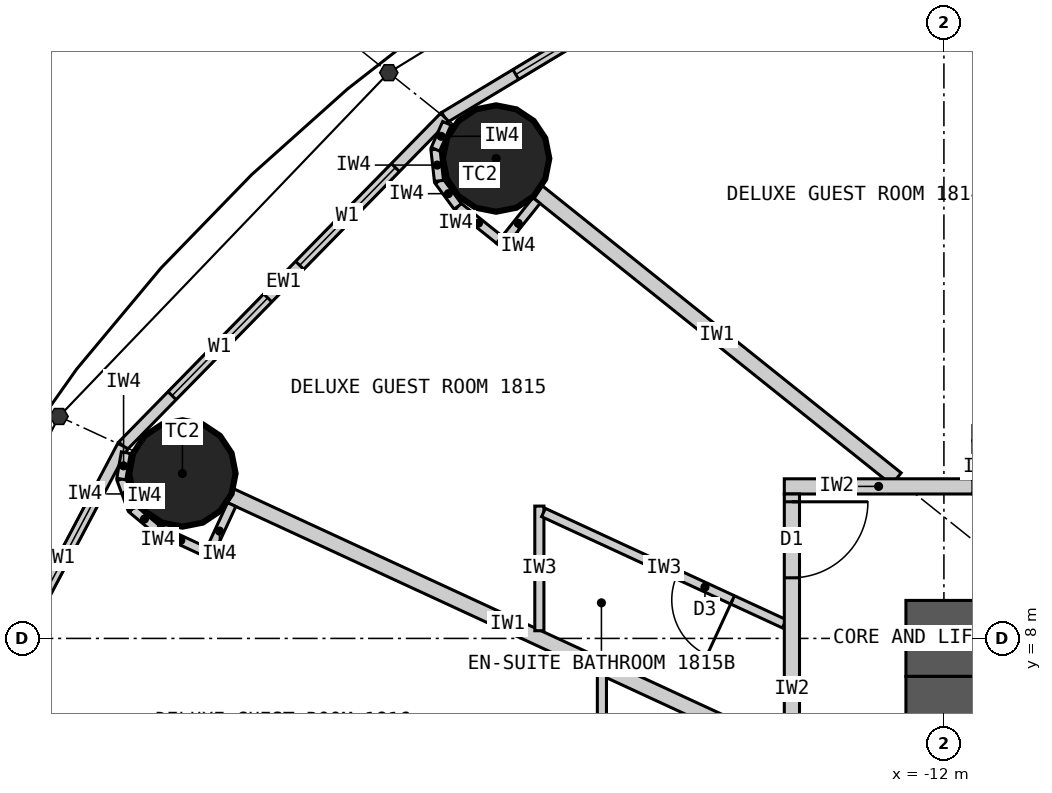
"""IFC4 building model, lengths in metres.
Left out: names, types, materials, properties, quantities, classifications, styles, units other than length and angle.
Written with IfcOpenShell. Run it as: python <this file> out.ifc"""

import sys

from ifc_helpers import new_model, si_unit, direction, frame, frame_2d, origin, origin_2d, place, context, subcontext, project, spatial, rectangle, circle, extrude, element, fill, save


model = new_model("IFC4")
c1 = context("Model", 3, precision=1e-05, world=origin(), true_north=direction((0.0, 1.0)))
c2 = subcontext(c1, "Body", "Model", "MODEL_VIEW")
j1 = project(units=[si_unit("LENGTHUNIT", "METRE"), si_unit("PLANEANGLEUNIT", "RADIAN")], contexts=[c1])
p1 = place(None, origin())
s1 = spatial("IfcSite", under=j1, at=p1, CompositionType="ELEMENT")
p2 = place(p1, origin())
s2 = spatial("IfcBuilding", under=s1, at=p2, CompositionType="ELEMENT")
p3 = place(p2, frame((0.0, 0.0, 73.8)))
s3 = spatial("IfcBuildingStorey", under=s2, at=p3, CompositionType="ELEMENT", Elevation=73.8)
for number, where, z_axis, x_axis in (
    (1, (-17.892, 14.313, 0.0), (0.0, 0.0, 1.0), (1.0, 0.0, 0.0)),
    (2, (-22.019, 10.17, 0.0), (0.0, 0.0, 1.0), (1.0, 0.0, 0.0)),
):
    element("IfcColumn", number, at=place(p3, frame(where, z_axis=z_axis, x_axis=x_axis)), inside=s3, PredefinedType="COLUMN", context=c2, shape_type="SweptSolid", body=[
        extrude(circle(Radius=0.7, at=origin_2d()), origin(), (0.0, 0.0, 1.0), 3.3),
    ])
p4 = place(p3, frame((-12.5, 8.0, 0.0), z_axis=(0.0, 0.0, 1.0), x_axis=(1.0, 0.0, 0.0)))
e3 = element("IfcWall", 3, at=p4, inside=s3, PredefinedType="SHEAR", context=c2, shape_type="SweptSolid", body=[
    extrude(rectangle(XDim=25.0, YDim=1.0, at=frame_2d((12.5, 0.0))), origin(), (0.0, 0.0, 1.0), 3.3),
])
p5 = place(p4, frame((11.2, 0.0, 0.0)))
e4 = element("IfcOpeningElement", 4, at=p5, cuts=e3, PredefinedType="OPENING", context=c2, shape_type="SweptSolid", body=[
    extrude(rectangle(XDim=1.2, YDim=2.2, at=frame_2d((0.6, 1.1))), frame((0.0, 0.51, 0.0), z_axis=(0.0, -1.0, 0.0), x_axis=(1.0, 0.0, 0.0)), (0.0, 0.0, 1.0), 1.02),
])
p6 = place(p4, frame((18.8, 0.0, 0.0)))
e5 = element("IfcOpeningElement", 5, at=p6, cuts=e3, PredefinedType="OPENING", context=c2, shape_type="SweptSolid", body=[
    extrude(rectangle(XDim=0.9, YDim=2.2, at=frame_2d((0.45, 1.1))), frame((0.0, 0.51, 0.0), z_axis=(0.0, -1.0, 0.0), x_axis=(1.0, 0.0, 0.0)), (0.0, 0.0, 1.0), 1.02),
])
p7 = place(p3, frame((-12.0, 7.5, 0.0), z_axis=(0.0, 0.0, 1.0), x_axis=(0.0, -1.0, 0.0)))
e6 = element("IfcWall", 6, at=p7, inside=s3, PredefinedType="SHEAR", context=c2, shape_type="SweptSolid", body=[
    extrude(rectangle(XDim=15.0, YDim=1.0, at=frame_2d((7.5, 0.0))), origin(), (0.0, 0.0, 1.0), 3.3),
])
p8 = place(p7, frame((6.6, 0.0, 0.0)))
e7 = element("IfcOpeningElement", 7, at=p8, cuts=e6, PredefinedType="OPENING", context=c2, shape_type="SweptSolid", body=[
    extrude(rectangle(XDim=1.8, YDim=2.2, at=frame_2d((0.9, 1.1))), frame((0.0, 0.51, 0.0), z_axis=(0.0, -1.0, 0.0), x_axis=(1.0, 0.0, 0.0)), (0.0, 0.0, 1.0), 1.02),
])
p9 = place(p3, frame((-13.096, 18.147, 0.0), z_axis=(0.0, 0.0, 1.0), x_axis=(-0.856983180864, -0.515344377787, 0.0)))
e8 = element("IfcWall", 8, at=p9, inside=s3, PredefinedType="ELEMENTEDWALL", context=c2, shape_type="SweptSolid", body=[
    extrude(rectangle(XDim=6.386, YDim=0.15, at=frame_2d((3.193, 0.0))), origin(), (0.0, 0.0, 1.0), 3.12),
])
p10 = place(p9, frame((1.093, 0.0, 0.9)))
e9 = element("IfcOpeningElement", 9, at=p10, cuts=e8, PredefinedType="OPENING", context=c2, shape_type="SweptSolid", body=[
    extrude(rectangle(XDim=1.8, YDim=1.9, at=frame_2d((0.9, 0.95))), frame((0.0, 0.085, 0.0), z_axis=(0.0, -1.0, 0.0), x_axis=(1.0, 0.0, 0.0)), (0.0, 0.0, 1.0), 0.17),
])
p11 = place(p9, frame((3.493, 0.0, 0.9)))
e10 = element("IfcOpeningElement", 10, at=p11, cuts=e8, PredefinedType="OPENING", context=c2, shape_type="SweptSolid", body=[
    extrude(rectangle(XDim=1.8, YDim=1.9, at=frame_2d((0.9, 0.95))), frame((0.0, 0.085, 0.0), z_axis=(0.0, -1.0, 0.0), x_axis=(1.0, 0.0, 0.0)), (0.0, 0.0, 1.0), 0.17),
])
p12 = place(p3, frame((-18.57, 14.856, 0.0), z_axis=(0.0, 0.0, 1.0), x_axis=(-0.699602905915, -0.714531856557, 0.0)))
e11 = element("IfcWall", 11, at=p12, inside=s3, PredefinedType="ELEMENTEDWALL", context=c2, shape_type="SweptSolid", body=[
    extrude(rectangle(XDim=6.051, YDim=0.15, at=frame_2d((3.025, 0.0))), origin(), (0.0, 0.0, 1.0), 3.12),
])
p13 = place(p12, frame((0.926, 0.0, 0.9)))
e12 = element("IfcOpeningElement", 12, at=p13, cuts=e11, PredefinedType="OPENING", context=c2, shape_type="SweptSolid", body=[
    extrude(rectangle(XDim=1.8, YDim=1.9, at=frame_2d((0.9, 0.95))), frame((0.0, 0.085, 0.0), z_axis=(0.0, -1.0, 0.0), x_axis=(1.0, 0.0, 0.0)), (0.0, 0.0, 1.0), 0.17),
])
p14 = place(p12, frame((3.325, 0.0, 0.9)))
e13 = element("IfcOpeningElement", 13, at=p14, cuts=e11, PredefinedType="OPENING", context=c2, shape_type="SweptSolid", body=[
    extrude(rectangle(XDim=1.8, YDim=1.9, at=frame_2d((0.9, 0.95))), frame((0.0, 0.085, 0.0), z_axis=(0.0, -1.0, 0.0), x_axis=(1.0, 0.0, 0.0)), (0.0, 0.0, 1.0), 0.17),
])
p15 = place(p3, frame((-22.803, 10.532, 0.0), z_axis=(0.0, 0.0, 1.0), x_axis=(-0.467296867008, -0.884100468321, 0.0)))
e14 = element("IfcWall", 14, at=p15, inside=s3, PredefinedType="ELEMENTEDWALL", context=c2, shape_type="SweptSolid", body=[
    extrude(rectangle(XDim=5.734, YDim=0.15, at=frame_2d((2.867, 0.0))), origin(), (0.0, 0.0, 1.0), 3.12),
])
p16 = place(p15, frame((0.767, 0.0, 0.9)))
e15 = element("IfcOpeningElement", 15, at=p16, cuts=e14, PredefinedType="OPENING", context=c2, shape_type="SweptSolid", body=[
    extrude(rectangle(XDim=1.8, YDim=1.9, at=frame_2d((0.9, 0.95))), frame((0.0, 0.085, 0.0), z_axis=(0.0, -1.0, 0.0), x_axis=(1.0, 0.0, 0.0)), (0.0, 0.0, 1.0), 0.17),
])
p17 = place(p15, frame((3.167, 0.0, 0.9)))
e16 = element("IfcOpeningElement", 16, at=p17, cuts=e14, PredefinedType="OPENING", context=c2, shape_type="SweptSolid", body=[
    extrude(rectangle(XDim=1.8, YDim=1.9, at=frame_2d((0.9, 0.95))), frame((0.0, 0.085, 0.0), z_axis=(0.0, -1.0, 0.0), x_axis=(1.0, 0.0, 0.0)), (0.0, 0.0, 1.0), 0.17),
])
p18 = place(p3, frame((-7.289, 10.1, 0.0), z_axis=(0.0, 0.0, 1.0), x_axis=(-0.585198353053, 0.810890182197, 0.0)))
e17 = element("IfcWall", 17, at=p18, inside=s3, PredefinedType="PARTITIONING", context=c2, shape_type="SweptSolid", body=[
    extrude(rectangle(XDim=8.36, YDim=0.2, at=frame_2d((4.18, 0.0))), origin(), (0.0, 0.0, 1.0), 2.32),
])
p19 = place(p3, frame((-12.625, 10.1, 0.0), z_axis=(0.0, 0.0, 1.0), x_axis=(-0.780892451574, 0.624665493744, 0.0)))
e18 = element("IfcWall", 18, at=p19, inside=s3, PredefinedType="PARTITIONING", context=c2, shape_type="SweptSolid", body=[
    extrude(rectangle(XDim=6.045, YDim=0.2, at=frame_2d((3.022, 0.0))), origin(), (0.0, 0.0, 1.0), 2.32),
])
p20 = place(p3, frame((-14.1, 6.512, 0.0), z_axis=(0.0, 0.0, 1.0), x_axis=(-0.907832871056, 0.419332181247, 0.0)))
e19 = element("IfcWall", 19, at=p20, inside=s3, PredefinedType="PARTITIONING", context=c2, shape_type="SweptSolid", body=[
    extrude(rectangle(XDim=8.023, YDim=0.2, at=frame_2d((4.011, 0.0))), origin(), (0.0, 0.0, 1.0), 2.32),
])
p21 = place(p3, frame((-17.323, 8.101, 0.0), z_axis=(0.0, 0.0, 1.0), x_axis=(0.0, 1.0, 0.0)))
e20 = element("IfcWall", 20, at=p21, inside=s3, PredefinedType="PARTITIONING", context=c2, shape_type="SweptSolid", body=[
    extrude(rectangle(XDim=1.64, YDim=0.12, at=frame_2d((0.82, 0.0))), origin(), (0.0, 0.0, 1.0), 3.12),
])
p22 = place(p3, frame((-14.1, 8.193, 0.0), z_axis=(0.0, 0.0, 1.0), x_axis=(-0.907836493557, 0.419324338628, 0.0)))
e21 = element("IfcWall", 21, at=p22, inside=s3, PredefinedType="PARTITIONING", context=c2, shape_type="SweptSolid", body=[
    extrude(rectangle(XDim=3.49, YDim=0.12, at=frame_2d((1.745, 0.0))), origin(), (0.0, 0.0, 1.0), 3.12),
])
p23 = place(p22, frame((0.75, 0.0, 0.0)))
e22 = element("IfcOpeningElement", 22, at=p23, cuts=e21, PredefinedType="OPENING", context=c2, shape_type="SweptSolid", body=[
    extrude(rectangle(XDim=0.8, YDim=2.1, at=frame_2d((0.4, 1.05))), frame((0.0, 0.07, 0.0), z_axis=(0.0, -1.0, 0.0), x_axis=(1.0, 0.0, 0.0)), (0.0, 0.0, 1.0), 0.14),
])
p24 = place(p3, frame((-16.5, 7.521, 0.0), z_axis=(0.0, 0.0, 1.0), x_axis=(0.0, -1.0, 0.0)))
e23 = element("IfcWall", 23, at=p24, inside=s3, PredefinedType="PARTITIONING", context=c2, shape_type="SweptSolid", body=[
    extrude(rectangle(XDim=2.749, YDim=0.12, at=frame_2d((1.374, 0.0))), origin(), (0.0, 0.0, 1.0), 3.12),
])
p25 = place(p3, frame((-14.1, 10.0, 0.0), z_axis=(0.0, 0.0, 1.0), x_axis=(1.0, 0.0, 0.0)))
e24 = element("IfcWall", 24, at=p25, inside=s3, PredefinedType="PARTITIONING", context=c2, shape_type="SweptSolid", body=[
    extrude(rectangle(XDim=2.481, YDim=0.2, at=frame_2d((1.24, 0.0))), origin(), (0.0, 0.0, 1.0), 3.12),
])
p26 = place(p3, frame((-14.0, 9.9, 0.0), z_axis=(0.0, 0.0, 1.0), x_axis=(0.0, -1.0, 0.0)))
e25 = element("IfcWall", 25, at=p26, inside=s3, PredefinedType="PARTITIONING", context=c2, shape_type="SweptSolid", body=[
    extrude(rectangle(XDim=5.127, YDim=0.2, at=frame_2d((2.564, 0.0))), origin(), (0.0, 0.0, 1.0), 3.12),
])
p27 = place(p26, frame((0.103, 0.0, 0.0)))
e26 = element("IfcOpeningElement", 26, at=p27, cuts=e25, PredefinedType="OPENING", context=c2, shape_type="SweptSolid", body=[
    extrude(rectangle(XDim=1.0, YDim=2.2, at=frame_2d((0.5, 1.1))), frame((0.0, 0.11, 0.0), z_axis=(0.0, -1.0, 0.0), x_axis=(1.0, 0.0, 0.0)), (0.0, 0.0, 1.0), 0.22),
])
p28 = place(p3, frame((-17.361, 13.76, 0.0), z_axis=(0.0, 0.0, 1.0), x_axis=(-0.624501042889, -0.781023973659, 0.0)))
e27 = element("IfcWall", 27, at=p28, inside=s3, PredefinedType="PARTITIONING", context=c2, shape_type="SweptSolid", body=[
    extrude(rectangle(XDim=0.767, YDim=0.12, at=frame_2d((0.384, 0.0))), origin(), (0.0, 0.0, 1.0), 3.12),
])
p29 = place(p3, frame((-17.85, 13.246, 0.0), z_axis=(0.0, 0.0, 1.0), x_axis=(-0.780902834923, 0.62465251333, 0.0)))
e28 = element("IfcWall", 28, at=p29, inside=s3, PredefinedType="PARTITIONING", context=c2, shape_type="SweptSolid", body=[
    extrude(rectangle(XDim=0.7, YDim=0.12, at=frame_2d((0.35, 0.0))), origin(), (0.0, 0.0, 1.0), 3.12),
])
for number, where, z_axis, x_axis in (
    (29, (-18.396, 13.683, 0.0), (0.0, 0.0, 1.0), (-0.592, 0.806, 0.0)),
    (30, (-18.644, 14.02, 0.0), (0.0, 0.0, 1.0), (-0.11, 0.994, 0.0)),
):
    element("IfcWall", number, at=place(p3, frame(where, z_axis=z_axis, x_axis=x_axis)), inside=s3, PredefinedType="PARTITIONING", context=c2, shape_type="SweptSolid", body=[
        extrude(rectangle(XDim=0.418, YDim=0.12, at=frame_2d((0.209, 0.0))), origin(), (0.0, 0.0, 1.0), 3.12),
    ])
p30 = place(p3, frame((-18.69, 14.435, 0.0), z_axis=(0.0, 0.0, 1.0), x_axis=(0.401093412634, 0.91603715773, 0.0)))
e31 = element("IfcWall", 31, at=p30, inside=s3, PredefinedType="PARTITIONING", context=c2, shape_type="SweptSolid", body=[
    extrude(rectangle(XDim=0.373, YDim=0.12, at=frame_2d((0.187, 0.0))), origin(), (0.0, 0.0, 1.0), 3.12),
])
p31 = place(p3, frame((-21.371, 9.761, 0.0), z_axis=(0.0, 0.0, 1.0), x_axis=(-0.419259891039, -0.907866258744, 0.0)))
e32 = element("IfcWall", 32, at=p31, inside=s3, PredefinedType="PARTITIONING", context=c2, shape_type="SweptSolid", body=[
    extrude(rectangle(XDim=0.768, YDim=0.12, at=frame_2d((0.384, 0.0))), origin(), (0.0, 0.0, 1.0), 3.12),
])
p32 = place(p3, frame((-21.722, 9.144, 0.0), z_axis=(0.0, 0.0, 1.0), x_axis=(-0.907877701396, 0.419235112208, 0.0)))
e33 = element("IfcWall", 33, at=p32, inside=s3, PredefinedType="PARTITIONING", context=c2, shape_type="SweptSolid", body=[
    extrude(rectangle(XDim=0.7, YDim=0.12, at=frame_2d((0.35, 0.0))), origin(), (0.0, 0.0, 1.0), 3.12),
])
p33 = place(p3, frame((-22.358, 9.437, 0.0), z_axis=(0.0, 0.0, 1.0), x_axis=(-0.768412687942, 0.639954639806, 0.0)))
e34 = element("IfcWall", 34, at=p33, inside=s3, PredefinedType="PARTITIONING", context=c2, shape_type="SweptSolid", body=[
    extrude(rectangle(XDim=0.418, YDim=0.12, at=frame_2d((0.209, 0.0))), origin(), (0.0, 0.0, 1.0), 3.12),
])
p34 = place(p3, frame((-22.679, 9.705, 0.0), z_axis=(0.0, 0.0, 1.0), x_axis=(-0.345164001646, 0.938542386879, 0.0)))
e35 = element("IfcWall", 35, at=p34, inside=s3, PredefinedType="PARTITIONING", context=c2, shape_type="SweptSolid", body=[
    extrude(rectangle(XDim=0.418, YDim=0.12, at=frame_2d((0.209, 0.0))), origin(), (0.0, 0.0, 1.0), 3.12),
])
p35 = place(p3, frame((-22.823, 10.097, 0.0), z_axis=(0.0, 0.0, 1.0), x_axis=(0.169674995186, 0.985500074079, 0.0)))
e36 = element("IfcWall", 36, at=p35, inside=s3, PredefinedType="PARTITIONING", context=c2, shape_type="SweptSolid", body=[
    extrude(rectangle(XDim=0.353, YDim=0.12, at=frame_2d((0.176, 0.0))), origin(), (0.0, 0.0, 1.0), 3.12),
])
p36 = place(p11, origin())
e37 = element("IfcWindow", 37, at=p36, inside=s3, PartitioningType="SINGLE_PANEL", PredefinedType="WINDOW", context=c2, shape_type="SweptSolid", body=[
    extrude(rectangle(XDim=1.8, YDim=1.9, at=frame_2d((0.9, 0.95))), frame((0.0, 0.03, 0.0), z_axis=(0.0, -1.0, 0.0), x_axis=(1.0, 0.0, 0.0)), (0.0, 0.0, 1.0), 0.06),
])
fill(e10, e37)
p37 = place(p13, origin())
e38 = element("IfcWindow", 38, at=p37, inside=s3, PartitioningType="SINGLE_PANEL", PredefinedType="WINDOW", context=c2, shape_type="SweptSolid", body=[
    extrude(rectangle(XDim=1.8, YDim=1.9, at=frame_2d((0.9, 0.95))), frame((0.0, 0.03, 0.0), z_axis=(0.0, -1.0, 0.0), x_axis=(1.0, 0.0, 0.0)), (0.0, 0.0, 1.0), 0.06),
])
fill(e12, e38)
p38 = place(p14, origin())
e39 = element("IfcWindow", 39, at=p38, inside=s3, PartitioningType="SINGLE_PANEL", PredefinedType="WINDOW", context=c2, shape_type="SweptSolid", body=[
    extrude(rectangle(XDim=1.8, YDim=1.9, at=frame_2d((0.9, 0.95))), frame((0.0, 0.03, 0.0), z_axis=(0.0, -1.0, 0.0), x_axis=(1.0, 0.0, 0.0)), (0.0, 0.0, 1.0), 0.06),
])
fill(e13, e39)
p39 = place(p16, origin())
e40 = element("IfcWindow", 40, at=p39, inside=s3, PartitioningType="SINGLE_PANEL", PredefinedType="WINDOW", context=c2, shape_type="SweptSolid", body=[
    extrude(rectangle(XDim=1.8, YDim=1.9, at=frame_2d((0.9, 0.95))), frame((0.0, 0.03, 0.0), z_axis=(0.0, -1.0, 0.0), x_axis=(1.0, 0.0, 0.0)), (0.0, 0.0, 1.0), 0.06),
])
fill(e15, e40)
p40 = place(p23, origin())
e41 = element("IfcDoor", 41, at=p40, inside=s3, OperationType="SINGLE_SWING_LEFT", PredefinedType="DOOR", context=c2, shape_type="SweptSolid", body=[
    extrude(rectangle(XDim=0.8, YDim=2.1, at=frame_2d((0.4, 1.05))), frame((0.0, 0.025, 0.0), z_axis=(0.0, -1.0, 0.0), x_axis=(1.0, 0.0, 0.0)), (0.0, 0.0, 1.0), 0.05),
])
fill(e22, e41)
p41 = place(p27, origin())
e42 = element("IfcDoor", 42, at=p41, inside=s3, OperationType="SINGLE_SWING_LEFT", PredefinedType="DOOR", context=c2, shape_type="SweptSolid", body=[
    extrude(rectangle(XDim=1.0, YDim=2.2, at=frame_2d((0.5, 1.1))), frame((0.0, 0.025, 0.0), z_axis=(0.0, -1.0, 0.0), x_axis=(1.0, 0.0, 0.0)), (0.0, 0.0, 1.0), 0.05),
])
fill(e26, e42)
save(model, sys.argv[1])
